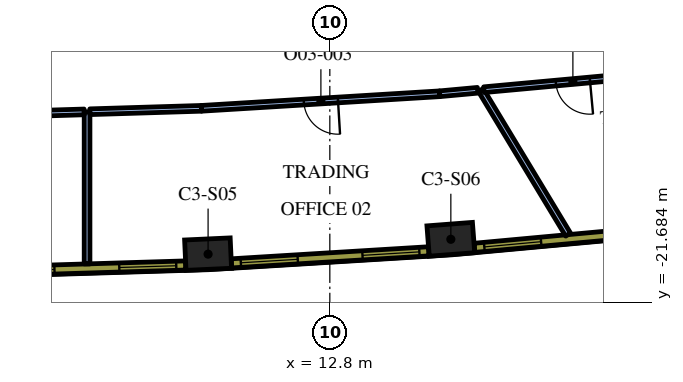
"""IFC4 building model, lengths in metres.
Left out: names, types, materials, properties, quantities, classifications, styles, units other than length and angle.
Written with IfcOpenShell. Run it as: python <this file> out.ifc"""

import sys

from ifc_helpers import new_model, si_unit, direction, frame, frame_2d, origin, origin_2d, place, context, subcontext, project, spatial, rectangle, extrude, element, fill, save


model = new_model("IFC4")
c1 = context("Model", 3, precision=1e-05, world=origin(), true_north=direction((0.0, 1.0)))
c2 = subcontext(c1, "Body", "Model", "MODEL_VIEW")
j1 = project(units=[si_unit("LENGTHUNIT", "METRE"), si_unit("PLANEANGLEUNIT", "RADIAN")], contexts=[c1])
p1 = place(None, origin())
s1 = spatial("IfcSite", under=j1, at=p1, CompositionType="ELEMENT")
p2 = place(p1, origin())
s2 = spatial("IfcBuilding", under=s1, at=p2, CompositionType="ELEMENT")
p3 = place(p2, frame((0.0, 0.0, 175.2)))
s3 = spatial("IfcBuildingStorey", under=s2, at=p3, CompositionType="ELEMENT", Elevation=175.2)
for number, where, z_axis, x_axis in (
    (1, (9.597, -20.413, 0.0), (0.0, 0.0, 1.0), (0.999, 0.046, 0.0)),
    (2, (15.985, -20.022, 0.0), (0.0, 0.0, 1.0), (0.997, 0.076, 0.0)),
):
    element("IfcColumn", number, at=place(p3, frame(where, z_axis=z_axis, x_axis=x_axis)), inside=s3, PredefinedType="COLUMN", context=c2, shape_type="SweptSolid", body=[
        extrude(rectangle(XDim=1.2, YDim=0.8, at=origin_2d()), origin(), (0.0, 0.0, 1.0), 4.2),
    ])
p4 = place(p3, frame((6.412, -16.668, 0.0), z_axis=(0.0, 0.0, 1.0), x_axis=(0.0, -1.0, 0.0)))
e3 = element("IfcWall", 3, at=p4, inside=s3, PredefinedType="PARTITIONING", context=c2, shape_type="SweptSolid", body=[
    extrude(rectangle(XDim=4.002, YDim=0.15, at=frame_2d((2.001, 0.0))), origin(), (0.0, 0.0, 1.0), 3.15),
])
p5 = place(p3, frame((3.141, -16.768, 0.0), z_axis=(0.0, 0.0, 1.0), x_axis=(0.999533369646, 0.030545751995, 0.0)))
e4 = element("IfcWall", 4, at=p5, inside=s3, PredefinedType="PARTITIONING", context=c2, shape_type="SweptSolid", body=[
    extrude(rectangle(XDim=3.197, YDim=0.15, at=frame_2d((1.599, 0.0))), origin(), (0.0, 0.0, 1.0), 3.15),
])
p6 = place(p3, frame((16.773, -16.094, 0.0), z_axis=(0.0, 0.0, 1.0), x_axis=(0.516844039178, -0.856079575253, 0.0)))
e5 = element("IfcWall", 5, at=p6, inside=s3, PredefinedType="PARTITIONING", context=c2, shape_type="SweptSolid", body=[
    extrude(rectangle(XDim=4.446, YDim=0.15, at=frame_2d((2.223, 0.0))), origin(), (0.0, 0.0, 1.0), 3.15),
])
p7 = place(p3, frame((6.487, -16.666, 0.0), z_axis=(0.0, 0.0, 1.0), x_axis=(0.999533978083, 0.030525835896, 0.0)))
e6 = element("IfcWall", 6, at=p7, inside=s3, PredefinedType="PARTITIONING", context=c2, shape_type="SweptSolid", body=[
    extrude(rectangle(XDim=2.935, YDim=0.15, at=frame_2d((1.468, 0.0))), origin(), (0.0, 0.0, 1.0), 3.15),
])
p8 = place(p3, frame((15.692, -16.193, 0.0), z_axis=(0.0, 0.0, 1.0), x_axis=(-0.998137075468, -0.061011298754, 0.0)))
e7 = element("IfcWall", 7, at=p8, inside=s3, PredefinedType="PARTITIONING", context=c2, shape_type="SweptSolid", body=[
    extrude(rectangle(XDim=6.282, YDim=0.15, at=frame_2d((3.141, 0.0))), origin(), (0.0, 0.0, 1.0), 3.15),
])
p9 = place(p8, frame((2.683, 0.0, 0.0)))
e8 = element("IfcOpeningElement", 8, at=p9, cuts=e7, PredefinedType="OPENING", context=c2, shape_type="SweptSolid", body=[
    extrude(rectangle(XDim=0.9, YDim=2.1, at=frame_2d((0.45, 1.05))), frame((0.0, 0.085, 0.0), z_axis=(0.0, -1.0, 0.0), x_axis=(1.0, 0.0, 0.0)), (0.0, 0.0, 1.0), 0.17),
])
p10 = place(p3, frame((15.692, -16.193, 0.0), z_axis=(0.0, 0.0, 1.0), x_axis=(0.995818997537, 0.091348366946, 0.0)))
e9 = element("IfcWall", 9, at=p10, inside=s3, PredefinedType="PARTITIONING", context=c2, shape_type="SweptSolid", body=[
    extrude(rectangle(XDim=1.002, YDim=0.15, at=frame_2d((0.501, 0.0))), origin(), (0.0, 0.0, 1.0), 3.15),
])
p11 = place(p3, frame((21.525, -15.657, 0.0), z_axis=(0.0, 0.0, 1.0), x_axis=(-0.99581172086, -0.091427657734, 0.0)))
e10 = element("IfcWall", 10, at=p11, inside=s3, PredefinedType="PARTITIONING", context=c2, shape_type="SweptSolid", body=[
    extrude(rectangle(XDim=4.689, YDim=0.15, at=frame_2d((2.344, 0.0))), origin(), (0.0, 0.0, 1.0), 3.15),
])
p12 = place(p11, frame((1.889, 0.0, 0.0)))
e11 = element("IfcOpeningElement", 11, at=p12, cuts=e10, PredefinedType="OPENING", context=c2, shape_type="SweptSolid", body=[
    extrude(rectangle(XDim=0.9, YDim=2.1, at=frame_2d((0.45, 1.05))), frame((0.0, 0.085, 0.0), z_axis=(0.0, -1.0, 0.0), x_axis=(1.0, 0.0, 0.0)), (0.0, 0.0, 1.0), 0.17),
])
p13 = place(p3, frame((3.806, -20.87, 0.0), z_axis=(0.0, 0.0, 1.0), x_axis=(0.999533441983, 0.030543384845, 0.0)))
e12 = element("IfcWall", 12, at=p13, inside=s3, PredefinedType="SOLIDWALL", context=c2, shape_type="SweptSolid", body=[
    extrude(rectangle(XDim=5.204, YDim=0.24, at=frame_2d((2.602, 0.0))), origin(), (0.0, 0.0, 1.0), 3.95),
])
p14 = place(p13, frame((0.248, 0.0, 0.9)))
e13 = element("IfcOpeningElement", 13, at=p14, cuts=e12, PredefinedType="OPENING", context=c2, shape_type="SweptSolid", body=[
    extrude(rectangle(XDim=1.5, YDim=2.55, at=frame_2d((0.75, 1.275))), frame((0.0, 0.13, 0.0), z_axis=(0.0, -1.0, 0.0), x_axis=(1.0, 0.0, 0.0)), (0.0, 0.0, 1.0), 0.26),
])
p15 = place(p13, frame((3.455, 0.0, 0.9)))
e14 = element("IfcOpeningElement", 14, at=p15, cuts=e12, PredefinedType="OPENING", context=c2, shape_type="SweptSolid", body=[
    extrude(rectangle(XDim=1.5, YDim=2.55, at=frame_2d((0.75, 1.275))), frame((0.0, 0.13, 0.0), z_axis=(0.0, -1.0, 0.0), x_axis=(1.0, 0.0, 0.0)), (0.0, 0.0, 1.0), 0.26),
])
p16 = place(p3, frame((10.211, -20.656, 0.0), z_axis=(0.0, 0.0, 1.0), x_axis=(0.998135294646, 0.061040425794, 0.0)))
e15 = element("IfcWall", 15, at=p16, inside=s3, PredefinedType="SOLIDWALL", context=c2, shape_type="SweptSolid", body=[
    extrude(rectangle(XDim=5.204, YDim=0.24, at=frame_2d((2.602, 0.0))), origin(), (0.0, 0.0, 1.0), 3.95),
])
p17 = place(p16, frame((0.248, 0.0, 0.9)))
e16 = element("IfcOpeningElement", 16, at=p17, cuts=e15, PredefinedType="OPENING", context=c2, shape_type="SweptSolid", body=[
    extrude(rectangle(XDim=1.5, YDim=2.55, at=frame_2d((0.75, 1.275))), frame((0.0, 0.13, 0.0), z_axis=(0.0, -1.0, 0.0), x_axis=(1.0, 0.0, 0.0)), (0.0, 0.0, 1.0), 0.26),
])
p18 = place(p16, frame((3.455, 0.0, 0.9)))
e17 = element("IfcOpeningElement", 17, at=p18, cuts=e15, PredefinedType="OPENING", context=c2, shape_type="SweptSolid", body=[
    extrude(rectangle(XDim=1.5, YDim=2.55, at=frame_2d((0.75, 1.275))), frame((0.0, 0.13, 0.0), z_axis=(0.0, -1.0, 0.0), x_axis=(1.0, 0.0, 0.0)), (0.0, 0.0, 1.0), 0.26),
])
p19 = place(p3, frame((16.606, -20.247, 0.0), z_axis=(0.0, 0.0, 1.0), x_axis=(0.995808712151, 0.091460422067, 0.0)))
e18 = element("IfcWall", 18, at=p19, inside=s3, PredefinedType="SOLIDWALL", context=c2, shape_type="SweptSolid", body=[
    extrude(rectangle(XDim=5.213, YDim=0.24, at=frame_2d((2.606, 0.0))), origin(), (0.0, 0.0, 1.0), 3.95),
])
p20 = place(p19, frame((0.261, 0.0, 0.9)))
e19 = element("IfcOpeningElement", 19, at=p20, cuts=e18, PredefinedType="OPENING", context=c2, shape_type="SweptSolid", body=[
    extrude(rectangle(XDim=1.5, YDim=2.55, at=frame_2d((0.75, 1.275))), frame((0.0, 0.13, 0.0), z_axis=(0.0, -1.0, 0.0), x_axis=(1.0, 0.0, 0.0)), (0.0, 0.0, 1.0), 0.26),
])
p21 = place(p19, frame((3.492, 0.0, 0.9)))
e20 = element("IfcOpeningElement", 20, at=p21, cuts=e18, PredefinedType="OPENING", context=c2, shape_type="SweptSolid", body=[
    extrude(rectangle(XDim=1.5, YDim=2.55, at=frame_2d((0.75, 1.275))), frame((0.0, 0.13, 0.0), z_axis=(0.0, -1.0, 0.0), x_axis=(1.0, 0.0, 0.0)), (0.0, 0.0, 1.0), 0.26),
])
p22 = place(p9, origin())
e21 = element("IfcDoor", 21, at=p22, inside=s3, OperationType="SINGLE_SWING_LEFT", PredefinedType="DOOR", context=c2, shape_type="SweptSolid", body=[
    extrude(rectangle(XDim=0.9, YDim=2.1, at=frame_2d((0.45, 1.05))), frame((0.0, 0.025, 0.0), z_axis=(0.0, -1.0, 0.0), x_axis=(1.0, 0.0, 0.0)), (0.0, 0.0, 1.0), 0.05),
])
fill(e8, e21)
p23 = place(p12, origin())
e22 = element("IfcDoor", 22, at=p23, inside=s3, OperationType="SINGLE_SWING_LEFT", PredefinedType="DOOR", context=c2, shape_type="SweptSolid", body=[
    extrude(rectangle(XDim=0.9, YDim=2.1, at=frame_2d((0.45, 1.05))), frame((0.0, 0.025, 0.0), z_axis=(0.0, -1.0, 0.0), x_axis=(1.0, 0.0, 0.0)), (0.0, 0.0, 1.0), 0.05),
])
fill(e11, e22)
p24 = place(p14, origin())
e23 = element("IfcWindow", 23, at=p24, inside=s3, PartitioningType="SINGLE_PANEL", PredefinedType="WINDOW", context=c2, shape_type="SweptSolid", body=[
    extrude(rectangle(XDim=1.5, YDim=2.55, at=frame_2d((0.75, 1.275))), frame((0.0, 0.04, 0.0), z_axis=(0.0, -1.0, 0.0), x_axis=(1.0, 0.0, 0.0)), (0.0, 0.0, 1.0), 0.06),
])
fill(e13, e23)
p25 = place(p15, origin())
e24 = element("IfcWindow", 24, at=p25, inside=s3, PartitioningType="SINGLE_PANEL", PredefinedType="WINDOW", context=c2, shape_type="SweptSolid", body=[
    extrude(rectangle(XDim=1.5, YDim=2.55, at=frame_2d((0.75, 1.275))), frame((0.0, 0.04, 0.0), z_axis=(0.0, -1.0, 0.0), x_axis=(1.0, 0.0, 0.0)), (0.0, 0.0, 1.0), 0.06),
])
fill(e14, e24)
p26 = place(p17, origin())
e25 = element("IfcWindow", 25, at=p26, inside=s3, PartitioningType="SINGLE_PANEL", PredefinedType="WINDOW", context=c2, shape_type="SweptSolid", body=[
    extrude(rectangle(XDim=1.5, YDim=2.55, at=frame_2d((0.75, 1.275))), frame((0.0, 0.04, 0.0), z_axis=(0.0, -1.0, 0.0), x_axis=(1.0, 0.0, 0.0)), (0.0, 0.0, 1.0), 0.06),
])
fill(e16, e25)
p27 = place(p18, origin())
e26 = element("IfcWindow", 26, at=p27, inside=s3, PartitioningType="SINGLE_PANEL", PredefinedType="WINDOW", context=c2, shape_type="SweptSolid", body=[
    extrude(rectangle(XDim=1.5, YDim=2.55, at=frame_2d((0.75, 1.275))), frame((0.0, 0.04, 0.0), z_axis=(0.0, -1.0, 0.0), x_axis=(1.0, 0.0, 0.0)), (0.0, 0.0, 1.0), 0.06),
])
fill(e17, e26)
p28 = place(p20, origin())
e27 = element("IfcWindow", 27, at=p28, inside=s3, PartitioningType="SINGLE_PANEL", PredefinedType="WINDOW", context=c2, shape_type="SweptSolid", body=[
    extrude(rectangle(XDim=1.5, YDim=2.55, at=frame_2d((0.75, 1.275))), frame((0.0, 0.04, 0.0), z_axis=(0.0, -1.0, 0.0), x_axis=(1.0, 0.0, 0.0)), (0.0, 0.0, 1.0), 0.06),
])
fill(e19, e27)
save(model, sys.argv[1])
